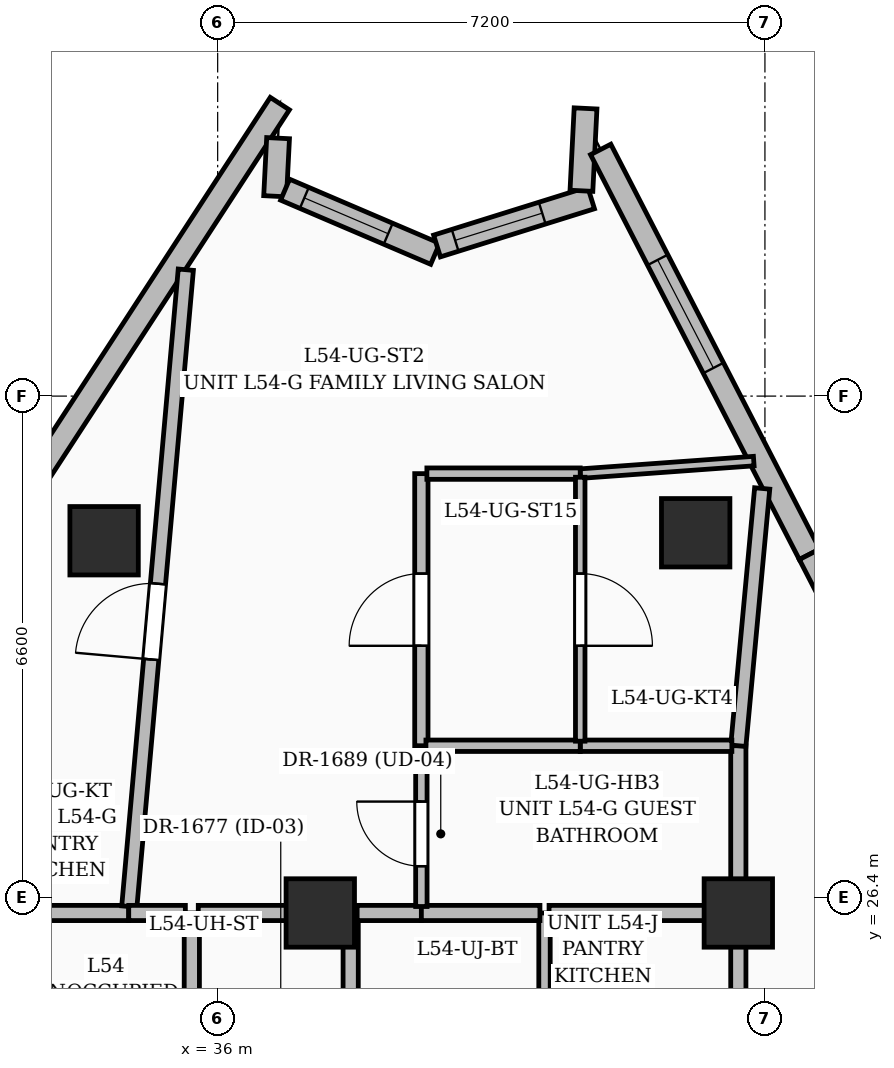
"""IFC4 building model, lengths in metres.
Left out: names, types, materials, properties, quantities, classifications, styles, units other than length and angle.
Written with IfcOpenShell. Run it as: python <this file> out.ifc"""

import sys

from ifc_helpers import new_model, si_unit, direction, frame, frame_2d, origin, origin_2d, place, context, subcontext, project, spatial, rectangle, extrude, element, fill, save


model = new_model("IFC4")
c1 = context("Model", 3, precision=1e-05, world=origin(), true_north=direction((0.0, 1.0)))
c2 = subcontext(c1, "Body", "Model", "MODEL_VIEW")
j1 = project(units=[si_unit("LENGTHUNIT", "METRE"), si_unit("PLANEANGLEUNIT", "RADIAN")], contexts=[c1])
p1 = place(None, origin())
s1 = spatial("IfcSite", under=j1, at=p1, CompositionType="ELEMENT")
p2 = place(p1, origin())
s2 = spatial("IfcBuilding", under=s1, at=p2, CompositionType="ELEMENT")
p3 = place(p2, frame((0.0, 0.0, 210.75)))
s3 = spatial("IfcBuildingStorey", under=s2, at=p3, CompositionType="ELEMENT", Elevation=210.75)
for number, where, z_axis, x_axis in (
    (1, (42.85, 26.2, 0.0), (0.0, 0.0, 1.0), (1.0, 0.0, 0.0)),
    (2, (37.35, 26.2, 0.0), (0.0, 0.0, 1.0), (1.0, 0.0, 0.0)),
    (3, (42.289, 31.202, 0.0), (0.0, 0.0, 1.0), (1.0, 0.0, 0.0)),
    (4, (34.506, 31.097, 0.0), (0.0, 0.0, 1.0), (1.0, 0.0, 0.0)),
):
    element("IfcColumn", number, at=place(p3, frame(where, z_axis=z_axis, x_axis=x_axis)), inside=s3, PredefinedType="COLUMN", context=c2, shape_type="SweptSolid", body=[
        extrude(rectangle(XDim=0.9, YDim=0.9, at=origin_2d()), origin(), (0.0, 0.0, 1.0), 3.75),
    ])
p4 = place(p3, frame((33.174, 31.251, 0.0), z_axis=(0.0, 0.0, 1.0), x_axis=(0.545624217243, 0.838029959821, 0.0)))
e5 = element("IfcWall", 5, at=p4, inside=s3, PredefinedType="SOLIDWALL", context=c2, shape_type="SweptSolid", body=[
    extrude(rectangle(XDim=6.679, YDim=0.3, at=frame_2d((3.339, 0.0))), origin(), (0.0, 0.0, 1.0), 3.5),
])
p5 = place(p3, frame((36.795, 36.394, 0.0), z_axis=(0.0, 0.0, 1.0), x_axis=(-0.051035290984, -0.998696850438, 0.0)))
e6 = element("IfcWall", 6, at=p5, inside=s3, PredefinedType="SOLIDWALL", context=c2, shape_type="SweptSolid", body=[
    extrude(rectangle(XDim=0.765, YDim=0.3, at=frame_2d((0.383, 0.0))), origin(), (0.0, 0.0, 1.0), 3.5),
])
p6 = place(p3, frame((36.887, 35.716, 0.0), z_axis=(0.0, 0.0, 1.0), x_axis=(0.919567916171, -0.392931097711, 0.0)))
e7 = element("IfcWall", 7, at=p6, inside=s3, PredefinedType="SOLIDWALL", context=c2, shape_type="SweptSolid", body=[
    extrude(rectangle(XDim=2.147, YDim=0.3, at=frame_2d((1.074, 0.0))), origin(), (0.0, 0.0, 1.0), 3.5),
])
p7 = place(p6, frame((0.275, 0.0, 0.8)))
e8 = element("IfcOpeningElement", 8, at=p7, cuts=e7, PredefinedType="OPENING", context=c2, shape_type="SweptSolid", body=[
    extrude(rectangle(XDim=1.2, YDim=1.8, at=frame_2d((0.6, 0.9))), frame((0.0, 0.16, 0.0), z_axis=(0.0, -1.0, 0.0), x_axis=(1.0, 0.0, 0.0)), (0.0, 0.0, 1.0), 0.32),
])
p8 = place(p3, frame((38.886, 34.975, 0.0), z_axis=(0.0, 0.0, 1.0), x_axis=(0.954524975295, 0.298130963736, 0.0)))
e9 = element("IfcWall", 9, at=p8, inside=s3, PredefinedType="SOLIDWALL", context=c2, shape_type="SweptSolid", body=[
    extrude(rectangle(XDim=2.124, YDim=0.3, at=frame_2d((1.062, 0.0))), origin(), (0.0, 0.0, 1.0), 3.5),
])
p9 = place(p8, frame((0.25, 0.0, 0.8)))
e10 = element("IfcOpeningElement", 10, at=p9, cuts=e9, PredefinedType="OPENING", context=c2, shape_type="SweptSolid", body=[
    extrude(rectangle(XDim=1.2, YDim=1.8, at=frame_2d((0.6, 0.9))), frame((0.0, 0.16, 0.0), z_axis=(0.0, -1.0, 0.0), x_axis=(1.0, 0.0, 0.0)), (0.0, 0.0, 1.0), 0.32),
])
p10 = place(p3, frame((40.786, 35.701, 0.0), z_axis=(0.0, 0.0, 1.0), x_axis=(0.05016199642, 0.998741094636, 0.0)))
e11 = element("IfcWall", 11, at=p10, inside=s3, PredefinedType="SOLIDWALL", context=c2, shape_type="SweptSolid", body=[
    extrude(rectangle(XDim=1.085, YDim=0.3, at=frame_2d((0.543, 0.0))), origin(), (0.0, 0.0, 1.0), 3.5),
])
p11 = place(p3, frame((41.039, 36.245, 0.0), z_axis=(0.0, 0.0, 1.0), x_axis=(0.458292150172, -0.888801611773, 0.0)))
e12 = element("IfcWall", 12, at=p11, inside=s3, PredefinedType="SOLIDWALL", context=c2, shape_type="SweptSolid", body=[
    extrude(rectangle(XDim=5.993, YDim=0.3, at=frame_2d((2.997, 0.0))), origin(), (0.0, 0.0, 1.0), 3.5),
])
p12 = place(p11, frame((1.635, 0.0, 0.55)))
e13 = element("IfcOpeningElement", 13, at=p12, cuts=e12, PredefinedType="OPENING", context=c2, shape_type="SweptSolid", body=[
    extrude(rectangle(XDim=1.6, YDim=2.2, at=frame_2d((0.8, 1.1))), frame((0.0, 0.16, 0.0), z_axis=(0.0, -1.0, 0.0), x_axis=(1.0, 0.0, 0.0)), (0.0, 0.0, 1.0), 0.32),
])
p13 = place(p3, frame((43.786, 30.918, 0.0), z_axis=(0.0, 0.0, 1.0), x_axis=(0.458349099599, -0.888772244671, 0.0)))
e14 = element("IfcWall", 14, at=p13, inside=s3, PredefinedType="SOLIDWALL", context=c2, shape_type="SweptSolid", body=[
    extrude(rectangle(XDim=6.583, YDim=0.3, at=frame_2d((3.292, 0.0))), origin(), (0.0, 0.0, 1.0), 3.5),
])
p14 = place(p13, frame((2.525, 0.0, 0.6)))
e15 = element("IfcOpeningElement", 15, at=p14, cuts=e14, PredefinedType="OPENING", context=c2, shape_type="SweptSolid", body=[
    extrude(rectangle(XDim=1.5, YDim=2.1, at=frame_2d((0.75, 1.05))), frame((0.0, 0.16, 0.0), z_axis=(0.0, -1.0, 0.0), x_axis=(1.0, 0.0, 0.0)), (0.0, 0.0, 1.0), 0.32),
])
p15 = place(p3, frame((33.485, 26.2, 0.0), z_axis=(0.0, 0.0, 1.0), x_axis=(1.0, 0.0, 0.0)))
e16 = element("IfcWall", 16, at=p15, inside=s3, PredefinedType="PARTITIONING", context=c2, shape_type="SweptSolid", body=[
    extrude(rectangle(XDim=1.345, YDim=0.2, at=frame_2d((0.672, 0.0))), origin(), (0.0, 0.0, 1.0), 3.16),
])
p16 = place(p3, frame((34.838, 26.285, 0.0), z_axis=(0.0, 0.0, 1.0), x_axis=(0.088352923437, 0.996089233412, 0.0)))
e17 = element("IfcWall", 17, at=p16, inside=s3, PredefinedType="PARTITIONING", context=c2, shape_type="SweptSolid", body=[
    extrude(rectangle(XDim=8.411, YDim=0.2, at=frame_2d((4.206, 0.0))), origin(), (0.0, 0.0, 1.0), 2.685),
])
p17 = place(p16, frame((3.264, 0.0, 0.0)))
e18 = element("IfcOpeningElement", 18, at=p17, cuts=e17, PredefinedType="OPENING", context=c2, shape_type="SweptSolid", body=[
    extrude(rectangle(XDim=1.0, YDim=2.2, at=frame_2d((0.5, 1.1))), frame((0.0, 0.11, 0.0), z_axis=(0.0, -1.0, 0.0), x_axis=(1.0, 0.0, 0.0)), (0.0, 0.0, 1.0), 0.22),
])
p18 = place(p3, frame((35.66, 26.2, 0.0), z_axis=(0.0, 0.0, 1.0), x_axis=(0.0, -1.0, 0.0)))
e19 = element("IfcWall", 19, at=p18, inside=s3, PredefinedType="PARTITIONING", context=c2, shape_type="SweptSolid", body=[
    extrude(rectangle(XDim=1.8, YDim=0.2, at=frame_2d((0.9, 0.0))), origin(), (0.0, 0.0, 1.0), 3.16),
])
p19 = place(p3, frame((37.75, 24.485, 0.0), z_axis=(0.0, 0.0, 1.0), x_axis=(0.0, 1.0, 0.0)))
e20 = element("IfcWall", 20, at=p19, inside=s3, PredefinedType="PARTITIONING", context=c2, shape_type="SweptSolid", body=[
    extrude(rectangle(XDim=1.715, YDim=0.2, at=frame_2d((0.857, 0.0))), origin(), (0.0, 0.0, 1.0), 2.685),
])
p20 = place(p3, frame((37.665, 26.2, 0.0), z_axis=(0.0, 0.0, 1.0), x_axis=(-1.0, 0.0, 0.0)))
e21 = element("IfcWall", 21, at=p20, inside=s3, PredefinedType="PARTITIONING", context=c2, shape_type="SweptSolid", body=[
    extrude(rectangle(XDim=1.92, YDim=0.2, at=frame_2d((0.96, 0.0))), origin(), (0.0, 0.0, 1.0), 3.16),
])
p21 = place(p3, frame((35.575, 26.2, 0.0), z_axis=(0.0, 0.0, 1.0), x_axis=(-1.0, 0.0, 0.0)))
e22 = element("IfcWall", 22, at=p21, inside=s3, PredefinedType="PARTITIONING", context=c2, shape_type="SweptSolid", body=[
    extrude(rectangle(XDim=0.745, YDim=0.2, at=frame_2d((0.373, 0.0))), origin(), (0.0, 0.0, 1.0), 3.16),
])
p22 = place(p3, frame((40.3, 26.2, 0.0), z_axis=(0.0, 0.0, 1.0), x_axis=(0.0, -1.0, 0.0)))
e23 = element("IfcWall", 23, at=p22, inside=s3, PredefinedType="PARTITIONING", context=c2, shape_type="SweptSolid", body=[
    extrude(rectangle(XDim=1.972, YDim=0.15, at=frame_2d((0.986, 0.0))), origin(), (0.0, 0.0, 1.0), 2.685),
])
p23 = place(p3, frame((42.85, 24.228, 0.0), z_axis=(0.0, 0.0, 1.0), x_axis=(0.0, 1.0, 0.0)))
e24 = element("IfcWall", 24, at=p23, inside=s3, PredefinedType="PARTITIONING", context=c2, shape_type="SweptSolid", body=[
    extrude(rectangle(XDim=1.972, YDim=0.2, at=frame_2d((0.986, 0.0))), origin(), (0.0, 0.0, 1.0), 2.685),
])
p24 = place(p3, frame((42.765, 26.2, 0.0), z_axis=(0.0, 0.0, 1.0), x_axis=(-1.0, 0.0, 0.0)))
e25 = element("IfcWall", 25, at=p24, inside=s3, PredefinedType="PARTITIONING", context=c2, shape_type="SweptSolid", body=[
    extrude(rectangle(XDim=2.405, YDim=0.2, at=frame_2d((1.202, 0.0))), origin(), (0.0, 0.0, 1.0), 2.685),
])
p25 = place(p3, frame((38.68, 26.2, 0.0), z_axis=(0.0, 0.0, 1.0), x_axis=(-1.0, 0.0, 0.0)))
e26 = element("IfcWall", 26, at=p25, inside=s3, PredefinedType="PARTITIONING", context=c2, shape_type="SweptSolid", body=[
    extrude(rectangle(XDim=0.845, YDim=0.2, at=frame_2d((0.422, 0.0))), origin(), (0.0, 0.0, 1.0), 2.685),
])
p26 = place(p3, frame((40.24, 26.2, 0.0), z_axis=(0.0, 0.0, 1.0), x_axis=(-1.0, 0.0, 0.0)))
e27 = element("IfcWall", 27, at=p26, inside=s3, PredefinedType="PARTITIONING", context=c2, shape_type="SweptSolid", body=[
    extrude(rectangle(XDim=1.56, YDim=0.2, at=frame_2d((0.78, 0.0))), origin(), (0.0, 0.0, 1.0), 2.685),
])
p27 = place(p3, frame((42.85, 28.4, 0.0), z_axis=(0.0, 0.0, 1.0), x_axis=(0.0, -1.0, 0.0)))
e28 = element("IfcWall", 28, at=p27, inside=s3, PredefinedType="PARTITIONING", context=c2, shape_type="SweptSolid", body=[
    extrude(rectangle(XDim=2.2, YDim=0.2, at=frame_2d((1.1, 0.0))), origin(), (0.0, 0.0, 1.0), 2.685),
])
p28 = place(p3, frame((43.164, 31.785, 0.0), z_axis=(0.0, 0.0, 1.0), x_axis=(-0.092355124874, -0.995726132483, 0.0)))
e29 = element("IfcWall", 29, at=p28, inside=s3, PredefinedType="PARTITIONING", context=c2, shape_type="SweptSolid", body=[
    extrude(rectangle(XDim=3.4, YDim=0.2, at=frame_2d((1.7, 0.0))), origin(), (0.0, 0.0, 1.0), 2.685),
])
p29 = place(p3, frame((38.68, 26.285, 0.0), z_axis=(0.0, 0.0, 1.0), x_axis=(0.0, 1.0, 0.0)))
e30 = element("IfcWall", 30, at=p29, inside=s3, PredefinedType="PARTITIONING", context=c2, shape_type="SweptSolid", body=[
    extrude(rectangle(XDim=2.115, YDim=0.15, at=frame_2d((1.058, 0.0))), origin(), (0.0, 0.0, 1.0), 2.685),
])
p30 = place(p29, frame((0.531, 0.0, 0.0)))
e31 = element("IfcOpeningElement", 31, at=p30, cuts=e30, PredefinedType="OPENING", context=c2, shape_type="SweptSolid", body=[
    extrude(rectangle(XDim=0.85, YDim=2.1, at=frame_2d((0.425, 1.05))), frame((0.0, 0.085, 0.0), z_axis=(0.0, -1.0, 0.0), x_axis=(1.0, 0.0, 0.0)), (0.0, 0.0, 1.0), 0.17),
])
p31 = place(p3, frame((40.77, 31.98, 0.0), z_axis=(0.0, 0.0, 1.0), x_axis=(0.997397150256, 0.072103568984, 0.0)))
e32 = element("IfcWall", 32, at=p31, inside=s3, PredefinedType="PARTITIONING", context=c2, shape_type="SweptSolid", body=[
    extrude(rectangle(XDim=2.289, YDim=0.125, at=frame_2d((1.145, 0.0))), origin(), (0.0, 0.0, 1.0), 3.5),
])
p32 = place(p3, frame((38.68, 28.4, 0.0), z_axis=(0.0, 0.0, 1.0), x_axis=(0.0, 1.0, 0.0)))
e33 = element("IfcWall", 33, at=p32, inside=s3, PredefinedType="PARTITIONING", context=c2, shape_type="SweptSolid", body=[
    extrude(rectangle(XDim=3.58, YDim=0.175, at=frame_2d((1.79, 0.0))), origin(), (0.0, 0.0, 1.0), 2.82),
])
p33 = place(p32, frame((1.315, 0.0, 0.0)))
e34 = element("IfcOpeningElement", 34, at=p33, cuts=e33, PredefinedType="OPENING", context=c2, shape_type="SweptSolid", body=[
    extrude(rectangle(XDim=0.95, YDim=2.2, at=frame_2d((0.475, 1.1))), frame((0.0, 0.097, 0.0), z_axis=(0.0, -1.0, 0.0), x_axis=(1.0, 0.0, 0.0)), (0.0, 0.0, 1.0), 0.195),
])
p34 = place(p3, frame((38.752, 31.98, 0.0), z_axis=(0.0, 0.0, 1.0), x_axis=(1.0, 0.0, 0.0)))
e35 = element("IfcWall", 35, at=p34, inside=s3, PredefinedType="PARTITIONING", context=c2, shape_type="SweptSolid", body=[
    extrude(rectangle(XDim=2.018, YDim=0.15, at=frame_2d((1.009, 0.0))), origin(), (0.0, 0.0, 1.0), 3.5),
])
p35 = place(p3, frame((42.765, 28.4, 0.0), z_axis=(0.0, 0.0, 1.0), x_axis=(-1.0, 0.0, 0.0)))
e36 = element("IfcWall", 36, at=p35, inside=s3, PredefinedType="PARTITIONING", context=c2, shape_type="SweptSolid", body=[
    extrude(rectangle(XDim=1.995, YDim=0.15, at=frame_2d((0.998, 0.0))), origin(), (0.0, 0.0, 1.0), 2.685),
])
p36 = place(p3, frame((40.77, 28.4, 0.0), z_axis=(0.0, 0.0, 1.0), x_axis=(-1.0, 0.0, 0.0)))
e37 = element("IfcWall", 37, at=p36, inside=s3, PredefinedType="PARTITIONING", context=c2, shape_type="SweptSolid", body=[
    extrude(rectangle(XDim=2.03, YDim=0.15, at=frame_2d((1.015, 0.0))), origin(), (0.0, 0.0, 1.0), 3.5),
])
p37 = place(p3, frame((40.77, 31.933, 0.0), z_axis=(0.0, 0.0, 1.0), x_axis=(0.0, -1.0, 0.0)))
e38 = element("IfcWall", 38, at=p37, inside=s3, PredefinedType="PARTITIONING", context=c2, shape_type="SweptSolid", body=[
    extrude(rectangle(XDim=3.473, YDim=0.125, at=frame_2d((1.736, 0.0))), origin(), (0.0, 0.0, 1.0), 2.82),
])
p38 = place(p37, frame((1.268, 0.0, 0.0)))
e39 = element("IfcOpeningElement", 39, at=p38, cuts=e38, PredefinedType="OPENING", context=c2, shape_type="SweptSolid", body=[
    extrude(rectangle(XDim=0.95, YDim=2.2, at=frame_2d((0.475, 1.1))), frame((0.0, 0.072, 0.0), z_axis=(0.0, -1.0, 0.0), x_axis=(1.0, 0.0, 0.0)), (0.0, 0.0, 1.0), 0.145),
])
p39 = place(p7, origin())
e40 = element("IfcWindow", 40, at=p39, inside=s3, PartitioningType="SINGLE_PANEL", PredefinedType="WINDOW", context=c2, shape_type="SweptSolid", body=[
    extrude(rectangle(XDim=1.2, YDim=1.8, at=frame_2d((0.6, 0.9))), frame((0.0, 0.03, 0.0), z_axis=(0.0, -1.0, 0.0), x_axis=(1.0, 0.0, 0.0)), (0.0, 0.0, 1.0), 0.06),
])
fill(e8, e40)
p40 = place(p9, origin())
e41 = element("IfcWindow", 41, at=p40, inside=s3, PartitioningType="SINGLE_PANEL", PredefinedType="WINDOW", context=c2, shape_type="SweptSolid", body=[
    extrude(rectangle(XDim=1.2, YDim=1.8, at=frame_2d((0.6, 0.9))), frame((0.0, 0.03, 0.0), z_axis=(0.0, -1.0, 0.0), x_axis=(1.0, 0.0, 0.0)), (0.0, 0.0, 1.0), 0.06),
])
fill(e10, e41)
p41 = place(p12, origin())
e42 = element("IfcWindow", 42, at=p41, inside=s3, PartitioningType="SINGLE_PANEL", PredefinedType="WINDOW", context=c2, shape_type="SweptSolid", body=[
    extrude(rectangle(XDim=1.6, YDim=2.2, at=frame_2d((0.8, 1.1))), frame((0.0, 0.03, 0.0), z_axis=(0.0, -1.0, 0.0), x_axis=(1.0, 0.0, 0.0)), (0.0, 0.0, 1.0), 0.06),
])
fill(e13, e42)
p42 = place(p38, origin())
e43 = element("IfcDoor", 43, at=p42, inside=s3, OperationType="SINGLE_SWING_RIGHT", PredefinedType="DOOR", context=c2, shape_type="SweptSolid", body=[
    extrude(rectangle(XDim=0.95, YDim=2.2, at=frame_2d((0.475, 1.1))), frame((0.0, 0.025, 0.0), z_axis=(0.0, -1.0, 0.0), x_axis=(1.0, 0.0, 0.0)), (0.0, 0.0, 1.0), 0.05),
])
fill(e39, e43)
p43 = place(p33, origin())
e44 = element("IfcDoor", 44, at=p43, inside=s3, OperationType="SINGLE_SWING_LEFT", PredefinedType="DOOR", context=c2, shape_type="SweptSolid", body=[
    extrude(rectangle(XDim=0.95, YDim=2.2, at=frame_2d((0.475, 1.1))), frame((0.0, 0.025, 0.0), z_axis=(0.0, -1.0, 0.0), x_axis=(1.0, 0.0, 0.0)), (0.0, 0.0, 1.0), 0.05),
])
fill(e34, e44)
p44 = place(p30, origin())
e45 = element("IfcDoor", 45, at=p44, inside=s3, OperationType="SINGLE_SWING_RIGHT", PredefinedType="DOOR", context=c2, shape_type="SweptSolid", body=[
    extrude(rectangle(XDim=0.85, YDim=2.1, at=frame_2d((0.425, 1.05))), frame((0.0, 0.025, 0.0), z_axis=(0.0, -1.0, 0.0), x_axis=(1.0, 0.0, 0.0)), (0.0, 0.0, 1.0), 0.05),
])
fill(e31, e45)
p45 = place(p17, origin())
e46 = element("IfcDoor", 46, at=p45, inside=s3, OperationType="SINGLE_SWING_LEFT", PredefinedType="DOOR", context=c2, shape_type="SweptSolid", body=[
    extrude(rectangle(XDim=1.0, YDim=2.2, at=frame_2d((0.5, 1.1))), frame((0.0, 0.025, 0.0), z_axis=(0.0, -1.0, 0.0), x_axis=(1.0, 0.0, 0.0)), (0.0, 0.0, 1.0), 0.05),
])
fill(e18, e46)
save(model, sys.argv[1])
